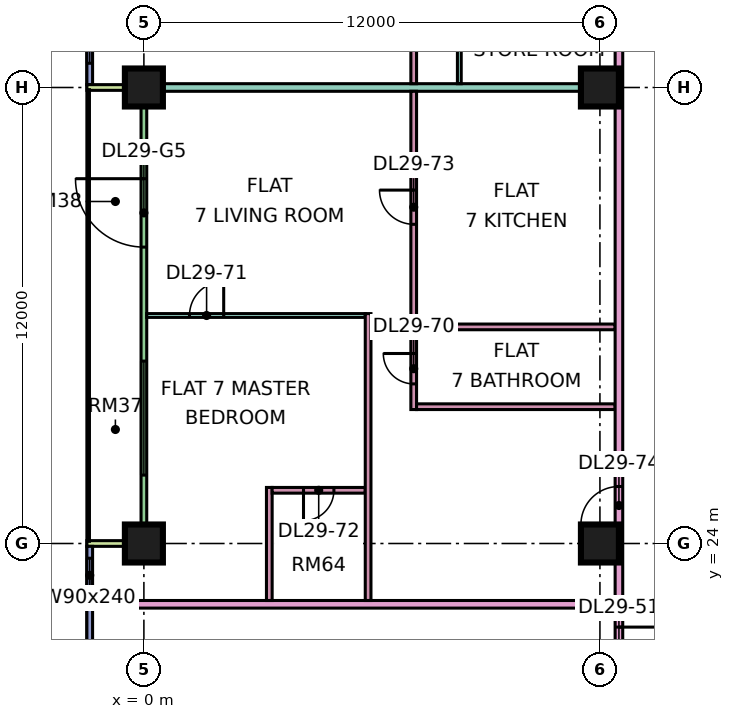
"""IFC4 building model, lengths in metres.
Left out: names, types, materials, properties, quantities, classifications, styles, units other than length and angle.
Written with IfcOpenShell. Run it as: python <this file> out.ifc"""

import sys

from ifc_helpers import new_model, si_unit, direction, frame, frame_2d, origin, origin_2d, place, context, subcontext, project, spatial, rectangle, extrude, element, fill, save


model = new_model("IFC4")
c1 = context("Model", 3, precision=1e-05, world=origin(), true_north=direction((0.0, 1.0)))
c2 = subcontext(c1, "Body", "Model", "MODEL_VIEW")
j1 = project(units=[si_unit("LENGTHUNIT", "METRE"), si_unit("PLANEANGLEUNIT", "RADIAN")], contexts=[c1])
p1 = place(None, origin())
s1 = spatial("IfcSite", under=j1, at=p1, CompositionType="ELEMENT")
p2 = place(p1, origin())
s2 = spatial("IfcBuilding", under=s1, at=p2, CompositionType="ELEMENT")
p3 = place(p2, frame((0.0, 0.0, 125.65)))
s3 = spatial("IfcBuildingStorey", under=s2, at=p3, CompositionType="ELEMENT", Elevation=125.65)
p4 = place(p3, frame((0.0, 24.0, 0.0), z_axis=(0.0, 0.0, 1.0), x_axis=(1.0, 0.0, 0.0)))
e1 = element("IfcColumn", 1, at=p4, inside=s3, PredefinedType="COLUMN", context=c2, shape_type="SweptSolid", body=[
    extrude(rectangle(XDim=1.0, YDim=1.0, at=origin_2d()), origin(), (0.0, 0.0, 1.0), 3.75),
])
p5 = place(p3, frame((0.0, 36.0, 0.0), z_axis=(0.0, 0.0, 1.0), x_axis=(1.0, 0.0, 0.0)))
e2 = element("IfcColumn", 2, at=p5, inside=s3, PredefinedType="COLUMN", context=c2, shape_type="SweptSolid", body=[
    extrude(rectangle(XDim=1.0, YDim=1.0, at=origin_2d()), origin(), (0.0, 0.0, 1.0), 3.75),
])
for number, where, z_axis, x_axis in (
    (3, (12.0, 24.0, 0.0), (0.0, 0.0, 1.0), (1.0, 0.0, 0.0)),
    (4, (12.0, 36.0, 0.0), (0.0, 0.0, 1.0), (1.0, 0.0, 0.0)),
):
    element("IfcColumn", number, at=place(p3, frame(where, z_axis=z_axis, x_axis=x_axis)), inside=s3, PredefinedType="COLUMN", context=c2, shape_type="SweptSolid", body=[
        extrude(rectangle(XDim=1.0, YDim=1.0, at=origin_2d()), origin(), (0.0, 0.0, 1.0), 3.75),
    ])
p6 = place(p3, frame((-1.425, 47.925, 0.0), z_axis=(0.0, 0.0, 1.0), x_axis=(0.0, -1.0, 0.0)))
e5 = element("IfcWall", 5, at=p6, inside=s3, PredefinedType="SOLIDWALL", context=c2, shape_type="SweptSolid", body=[
    extrude(rectangle(XDim=11.85, YDim=0.15, at=frame_2d((5.925, 0.0))), origin(), (0.0, 0.0, 1.0), 3.35),
])
p7 = place(p6, frame((0.562, 0.0, 0.45)))
e6 = element("IfcOpeningElement", 6, at=p7, cuts=e5, PredefinedType="OPENING", context=c2, shape_type="SweptSolid", body=[
    extrude(rectangle(XDim=1.8, YDim=2.4, at=frame_2d((0.9, 1.2))), frame((0.0, 0.085, 0.0), z_axis=(0.0, -1.0, 0.0), x_axis=(1.0, 0.0, 0.0)), (0.0, 0.0, 1.0), 0.17),
])
p8 = place(p6, frame((4.425, 0.0, 0.45)))
e7 = element("IfcOpeningElement", 7, at=p8, cuts=e5, PredefinedType="OPENING", context=c2, shape_type="SweptSolid", body=[
    extrude(rectangle(XDim=3.0, YDim=2.4, at=frame_2d((1.5, 1.2))), frame((0.0, 0.085, 0.0), z_axis=(0.0, -1.0, 0.0), x_axis=(1.0, 0.0, 0.0)), (0.0, 0.0, 1.0), 0.17),
])
p9 = place(p6, frame((9.488, 0.0, 0.45)))
e8 = element("IfcOpeningElement", 8, at=p9, cuts=e5, PredefinedType="OPENING", context=c2, shape_type="SweptSolid", body=[
    extrude(rectangle(XDim=1.8, YDim=2.4, at=frame_2d((0.9, 1.2))), frame((0.0, 0.085, 0.0), z_axis=(0.0, -1.0, 0.0), x_axis=(1.0, 0.0, 0.0)), (0.0, 0.0, 1.0), 0.17),
])
p10 = place(p3, frame((0.0, 35.925, 0.0), z_axis=(0.0, 0.0, 1.0), x_axis=(0.0, -1.0, 0.0)))
e9 = element("IfcWall", 9, at=p10, inside=s3, PredefinedType="SOLIDWALL", context=c2, shape_type="SweptSolid", body=[
    extrude(rectangle(XDim=11.85, YDim=0.15, at=frame_2d((5.925, 0.0))), origin(), (0.0, 0.0, 1.0), 3.35),
])
p11 = place(p10, frame((2.325, 0.0, 0.0)))
e10 = element("IfcOpeningElement", 10, at=p11, cuts=e9, PredefinedType="OPENING", context=c2, shape_type="SweptSolid", body=[
    extrude(rectangle(XDim=1.8, YDim=2.4, at=frame_2d((0.9, 1.2))), frame((0.0, 0.085, 0.0), z_axis=(0.0, -1.0, 0.0), x_axis=(1.0, 0.0, 0.0)), (0.0, 0.0, 1.0), 0.17),
])
p12 = place(p10, frame((7.125, 0.0, 0.45)))
e11 = element("IfcOpeningElement", 11, at=p12, cuts=e9, PredefinedType="OPENING", context=c2, shape_type="SweptSolid", body=[
    extrude(rectangle(XDim=3.0, YDim=2.4, at=frame_2d((1.5, 1.2))), frame((0.0, 0.085, 0.0), z_axis=(0.0, -1.0, 0.0), x_axis=(1.0, 0.0, 0.0)), (0.0, 0.0, 1.0), 0.17),
])
for number, where, z_axis, x_axis in (
    (12, (-1.5, 36.0, 0.0), (0.0, 0.0, 1.0), (1.0, 0.0, 0.0)),
    (13, (-1.5, 24.0, 0.0), (0.0, 0.0, 1.0), (1.0, 0.0, 0.0)),
):
    element("IfcWall", number, at=place(p3, frame(where, z_axis=z_axis, x_axis=x_axis)), inside=s3, PredefinedType="SOLIDWALL", context=c2, shape_type="SweptSolid", body=[
        extrude(rectangle(XDim=1.5, YDim=0.15, at=frame_2d((0.75, 0.0))), origin(), (0.0, 0.0, 1.0), 3.35),
    ])
p13 = place(p3, frame((-1.425, 23.925, 0.0), z_axis=(0.0, 0.0, 1.0), x_axis=(0.0, -1.0, 0.0)))
e14 = element("IfcWall", 14, at=p13, inside=s3, PredefinedType="SOLIDWALL", context=c2, shape_type="SweptSolid", body=[
    extrude(rectangle(XDim=11.425, YDim=0.15, at=frame_2d((5.712, 0.0))), origin(), (0.0, 0.0, 1.0), 3.35),
])
p14 = place(p13, frame((0.312, 0.0, 0.45)))
e15 = element("IfcOpeningElement", 15, at=p14, cuts=e14, PredefinedType="OPENING", context=c2, shape_type="SweptSolid", body=[
    extrude(rectangle(XDim=0.9, YDim=2.4, at=frame_2d((0.45, 1.2))), frame((0.0, 0.085, 0.0), z_axis=(0.0, -1.0, 0.0), x_axis=(1.0, 0.0, 0.0)), (0.0, 0.0, 1.0), 0.17),
])
p15 = place(p13, frame((6.175, 0.0, 0.45)))
e16 = element("IfcOpeningElement", 16, at=p15, cuts=e14, PredefinedType="OPENING", context=c2, shape_type="SweptSolid", body=[
    extrude(rectangle(XDim=3.0, YDim=2.4, at=frame_2d((1.5, 1.2))), frame((0.0, 0.085, 0.0), z_axis=(0.0, -1.0, 0.0), x_axis=(1.0, 0.0, 0.0)), (0.0, 0.0, 1.0), 0.17),
])
p16 = place(p3, frame((-1.35, 22.4, 0.0), z_axis=(0.0, 0.0, 1.0), x_axis=(1.0, 0.0, 0.0)))
e17 = element("IfcWall", 17, at=p16, inside=s3, PredefinedType="PARTITIONING", context=c2, shape_type="SweptSolid", body=[
    extrude(rectangle(XDim=13.75, YDim=0.2, at=frame_2d((6.875, 0.0))), origin(), (0.0, 0.0, 1.0), 3.35),
])
e18 = element("IfcWall", 18, at=p5, inside=s3, PredefinedType="PARTITIONING", context=c2, shape_type="SweptSolid", body=[
    extrude(rectangle(XDim=12.4, YDim=0.2, at=frame_2d((6.2, 0.0))), origin(), (0.0, 0.0, 1.0), 3.35),
])
p17 = place(p3, frame((0.074, 30.0, 0.0), z_axis=(0.0, 0.0, 1.0), x_axis=(1.0, 0.0, 0.0)))
e19 = element("IfcWall", 19, at=p17, inside=s3, PredefinedType="PARTITIONING", context=c2, shape_type="SweptSolid", body=[
    extrude(rectangle(XDim=5.751, YDim=0.1, at=frame_2d((2.875, 0.0))), origin(), (0.0, 0.0, 1.0), 3.35),
])
p18 = place(p17, frame((1.126, 0.0, 0.0)))
e20 = element("IfcOpeningElement", 20, at=p18, cuts=e19, PredefinedType="OPENING", context=c2, shape_type="SweptSolid", body=[
    extrude(rectangle(XDim=0.9, YDim=2.1, at=frame_2d((0.45, 1.05))), frame((0.0, 0.06, 0.0), z_axis=(0.0, -1.0, 0.0), x_axis=(1.0, 0.0, 0.0)), (0.0, 0.0, 1.0), 0.12),
])
p19 = place(p3, frame((3.3, 22.5, 0.0), z_axis=(0.0, 0.0, 1.0), x_axis=(0.0, 1.0, 0.0)))
e21 = element("IfcWall", 21, at=p19, inside=s3, PredefinedType="PARTITIONING", context=c2, shape_type="SweptSolid", body=[
    extrude(rectangle(XDim=2.975, YDim=0.15, at=frame_2d((1.488, 0.0))), origin(), (0.0, 0.0, 1.0), 3.35),
])
p20 = place(p3, frame((3.375, 25.4, 0.0), z_axis=(0.0, 0.0, 1.0), x_axis=(1.0, 0.0, 0.0)))
e22 = element("IfcWall", 22, at=p20, inside=s3, PredefinedType="PARTITIONING", context=c2, shape_type="SweptSolid", body=[
    extrude(rectangle(XDim=2.45, YDim=0.15, at=frame_2d((1.225, 0.0))), origin(), (0.0, 0.0, 1.0), 3.35),
])
p21 = place(p20, frame((0.825, 0.0, 0.0)))
e23 = element("IfcOpeningElement", 23, at=p21, cuts=e22, PredefinedType="OPENING", context=c2, shape_type="SweptSolid", body=[
    extrude(rectangle(XDim=0.8, YDim=2.1, at=frame_2d((0.4, 1.05))), frame((0.0, 0.085, 0.0), z_axis=(0.0, -1.0, 0.0), x_axis=(1.0, 0.0, 0.0)), (0.0, 0.0, 1.0), 0.17),
])
p22 = place(p3, frame((5.9, 22.5, 0.0), z_axis=(0.0, 0.0, 1.0), x_axis=(0.0, 1.0, 0.0)))
e24 = element("IfcWall", 24, at=p22, inside=s3, PredefinedType="PARTITIONING", context=c2, shape_type="SweptSolid", body=[
    extrude(rectangle(XDim=7.55, YDim=0.15, at=frame_2d((3.775, 0.0))), origin(), (0.0, 0.0, 1.0), 3.35),
])
p23 = place(p3, frame((7.1, 27.525, 0.0), z_axis=(0.0, 0.0, 1.0), x_axis=(0.0, 1.0, 0.0)))
e25 = element("IfcWall", 25, at=p23, inside=s3, PredefinedType="PARTITIONING", context=c2, shape_type="SweptSolid", body=[
    extrude(rectangle(XDim=8.375, YDim=0.15, at=frame_2d((4.188, 0.0))), origin(), (0.0, 0.0, 1.0), 3.35),
])
p24 = place(p23, frame((0.675, 0.0, 0.0)))
e26 = element("IfcOpeningElement", 26, at=p24, cuts=e25, PredefinedType="OPENING", context=c2, shape_type="SweptSolid", body=[
    extrude(rectangle(XDim=0.8, YDim=2.1, at=frame_2d((0.4, 1.05))), frame((0.0, 0.085, 0.0), z_axis=(0.0, -1.0, 0.0), x_axis=(1.0, 0.0, 0.0)), (0.0, 0.0, 1.0), 0.17),
])
p25 = place(p23, frame((4.875, 0.0, 0.0)))
e27 = element("IfcOpeningElement", 27, at=p25, cuts=e25, PredefinedType="OPENING", context=c2, shape_type="SweptSolid", body=[
    extrude(rectangle(XDim=0.9, YDim=2.1, at=frame_2d((0.45, 1.05))), frame((0.0, 0.085, 0.0), z_axis=(0.0, -1.0, 0.0), x_axis=(1.0, 0.0, 0.0)), (0.0, 0.0, 1.0), 0.17),
])
p26 = place(p3, frame((7.1, 36.1, 0.0), z_axis=(0.0, 0.0, 1.0), x_axis=(0.0, 1.0, 0.0)))
e28 = element("IfcWall", 28, at=p26, inside=s3, PredefinedType="PARTITIONING", context=c2, shape_type="SweptSolid", body=[
    extrude(rectangle(XDim=26.826, YDim=0.15, at=frame_2d((13.413, 0.0))), origin(), (0.0, 0.0, 1.0), 3.35),
])
p27 = place(p26, frame((0.95, 0.0, 0.0)))
e29 = element("IfcOpeningElement", 29, at=p27, cuts=e28, PredefinedType="OPENING", context=c2, shape_type="SweptSolid", body=[
    extrude(rectangle(XDim=0.9, YDim=2.1, at=frame_2d((0.45, 1.05))), frame((0.0, 0.085, 0.0), z_axis=(0.0, -1.0, 0.0), x_axis=(1.0, 0.0, 0.0)), (0.0, 0.0, 1.0), 0.17),
])
p28 = place(p26, frame((9.95, 0.0, 0.0)))
e30 = element("IfcOpeningElement", 30, at=p28, cuts=e28, PredefinedType="OPENING", context=c2, shape_type="SweptSolid", body=[
    extrude(rectangle(XDim=0.9, YDim=2.1, at=frame_2d((0.45, 1.05))), frame((0.0, 0.085, 0.0), z_axis=(0.0, -1.0, 0.0), x_axis=(1.0, 0.0, 0.0)), (0.0, 0.0, 1.0), 0.17),
])
p29 = place(p26, frame((6.95, 0.0, 0.0)))
e31 = element("IfcOpeningElement", 31, at=p29, cuts=e28, PredefinedType="OPENING", context=c2, shape_type="SweptSolid", body=[
    extrude(rectangle(XDim=0.9, YDim=2.1, at=frame_2d((0.45, 1.05))), frame((0.0, 0.085, 0.0), z_axis=(0.0, -1.0, 0.0), x_axis=(1.0, 0.0, 0.0)), (0.0, 0.0, 1.0), 0.17),
])
p30 = place(p26, frame((20.45, 0.0, 0.0)))
e32 = element("IfcOpeningElement", 32, at=p30, cuts=e28, PredefinedType="OPENING", context=c2, shape_type="SweptSolid", body=[
    extrude(rectangle(XDim=0.9, YDim=2.1, at=frame_2d((0.45, 1.05))), frame((0.0, 0.085, 0.0), z_axis=(0.0, -1.0, 0.0), x_axis=(1.0, 0.0, 0.0)), (0.0, 0.0, 1.0), 0.17),
])
p31 = place(p26, frame((25.8, 0.0, 0.0)))
e33 = element("IfcOpeningElement", 33, at=p31, cuts=e28, PredefinedType="OPENING", context=c2, shape_type="SweptSolid", body=[
    extrude(rectangle(XDim=0.8, YDim=2.1, at=frame_2d((0.4, 1.05))), frame((0.0, 0.085, 0.0), z_axis=(0.0, -1.0, 0.0), x_axis=(1.0, 0.0, 0.0)), (0.0, 0.0, 1.0), 0.17),
])
p32 = place(p26, frame((12.55, 0.0, 0.0)))
e34 = element("IfcOpeningElement", 34, at=p32, cuts=e28, PredefinedType="OPENING", context=c2, shape_type="SweptSolid", body=[
    extrude(rectangle(XDim=1.6, YDim=2.1, at=frame_2d((0.8, 1.05))), frame((0.0, 0.085, 0.0), z_axis=(0.0, -1.0, 0.0), x_axis=(1.0, 0.0, 0.0)), (0.0, 0.0, 1.0), 0.17),
])
p33 = place(p26, frame((15.95, 0.0, 0.0)))
e35 = element("IfcOpeningElement", 35, at=p33, cuts=e28, PredefinedType="OPENING", context=c2, shape_type="SweptSolid", body=[
    extrude(rectangle(XDim=0.9, YDim=2.1, at=frame_2d((0.45, 1.05))), frame((0.0, 0.085, 0.0), z_axis=(0.0, -1.0, 0.0), x_axis=(1.0, 0.0, 0.0)), (0.0, 0.0, 1.0), 0.17),
])
for number, where, z_axis, x_axis in (
    (36, (7.175, 27.6, 0.0), (0.0, 0.0, 1.0), (1.0, 0.0, 0.0)),
    (37, (7.175, 29.7, 0.0), (0.0, 0.0, 1.0), (1.0, 0.0, 0.0)),
):
    element("IfcWall", number, at=place(p3, frame(where, z_axis=z_axis, x_axis=x_axis)), inside=s3, PredefinedType="PARTITIONING", context=c2, shape_type="SweptSolid", body=[
        extrude(rectangle(XDim=5.225, YDim=0.15, at=frame_2d((2.612, 0.0))), origin(), (0.0, 0.0, 1.0), 3.35),
    ])
p34 = place(p3, frame((8.3, 36.1, 0.0), z_axis=(0.0, 0.0, 1.0), x_axis=(0.0, 1.0, 0.0)))
e38 = element("IfcWall", 38, at=p34, inside=s3, PredefinedType="PARTITIONING", context=c2, shape_type="SweptSolid", body=[
    extrude(rectangle(XDim=2.55, YDim=0.1, at=frame_2d((1.275, 0.0))), origin(), (0.0, 0.0, 1.0), 3.35),
])
p35 = place(p3, frame((12.5, 20.0, 0.0), z_axis=(0.0, 0.0, 1.0), x_axis=(0.0, 1.0, 0.0)))
e39 = element("IfcWall", 39, at=p35, inside=s3, PredefinedType="PARTITIONING", context=c2, shape_type="SweptSolid", body=[
    extrude(rectangle(XDim=43.0, YDim=0.2, at=frame_2d((21.5, 0.0))), origin(), (0.0, 0.0, 1.0), 3.35),
])
p36 = place(p35, frame((19.65, 0.0, 0.0)))
e40 = element("IfcOpeningElement", 40, at=p36, cuts=e39, PredefinedType="OPENING", context=c2, shape_type="SweptSolid", body=[
    extrude(rectangle(XDim=1.0, YDim=2.1, at=frame_2d((0.5, 1.05))), frame((0.0, 0.11, 0.0), z_axis=(0.0, -1.0, 0.0), x_axis=(1.0, 0.0, 0.0)), (0.0, 0.0, 1.0), 0.22),
])
p37 = place(p35, frame((0.6, 0.0, 0.0)))
e41 = element("IfcOpeningElement", 41, at=p37, cuts=e39, PredefinedType="OPENING", context=c2, shape_type="SweptSolid", body=[
    extrude(rectangle(XDim=1.2, YDim=2.1, at=frame_2d((0.6, 1.05))), frame((0.0, 0.11, 0.0), z_axis=(0.0, -1.0, 0.0), x_axis=(1.0, 0.0, 0.0)), (0.0, 0.0, 1.0), 0.22),
])
p38 = place(p35, frame((4.5, 0.0, 0.0)))
e42 = element("IfcOpeningElement", 42, at=p38, cuts=e39, PredefinedType="OPENING", context=c2, shape_type="SweptSolid", body=[
    extrude(rectangle(XDim=1.0, YDim=2.1, at=frame_2d((0.5, 1.05))), frame((0.0, 0.11, 0.0), z_axis=(0.0, -1.0, 0.0), x_axis=(1.0, 0.0, 0.0)), (0.0, 0.0, 1.0), 0.22),
])
p39 = place(p9, origin())
e43 = element("IfcWindow", 43, at=p39, inside=s3, PartitioningType="SINGLE_PANEL", PredefinedType="WINDOW", context=c2, shape_type="SweptSolid", body=[
    extrude(rectangle(XDim=1.8, YDim=2.4, at=frame_2d((0.9, 1.2))), frame((0.0, 0.03, 0.0), z_axis=(0.0, -1.0, 0.0), x_axis=(1.0, 0.0, 0.0)), (0.0, 0.0, 1.0), 0.06),
])
fill(e8, e43)
p40 = place(p11, frame((1.8, 0.0, 0.0), z_axis=(0.0, 0.0, 1.0), x_axis=(-1.0, 0.0, 0.0)))
e44 = element("IfcDoor", 44, at=p40, inside=s3, OperationType="DOUBLE_DOOR_SINGLE_SWING", PredefinedType="DOOR", context=c2, shape_type="SweptSolid", body=[
    extrude(rectangle(XDim=1.8, YDim=2.4, at=frame_2d((0.9, 1.2))), frame((0.0, 0.025, 0.0), z_axis=(0.0, -1.0, 0.0), x_axis=(1.0, 0.0, 0.0)), (0.0, 0.0, 1.0), 0.05),
])
fill(e10, e44)
p41 = place(p12, origin())
e45 = element("IfcWindow", 45, at=p41, inside=s3, PartitioningType="SINGLE_PANEL", PredefinedType="WINDOW", context=c2, shape_type="SweptSolid", body=[
    extrude(rectangle(XDim=3.0, YDim=2.4, at=frame_2d((1.5, 1.2))), frame((0.0, 0.03, 0.0), z_axis=(0.0, -1.0, 0.0), x_axis=(1.0, 0.0, 0.0)), (0.0, 0.0, 1.0), 0.06),
])
fill(e11, e45)
p42 = place(p14, origin())
e46 = element("IfcWindow", 46, at=p42, inside=s3, PartitioningType="SINGLE_PANEL", PredefinedType="WINDOW", context=c2, shape_type="SweptSolid", body=[
    extrude(rectangle(XDim=0.9, YDim=2.4, at=frame_2d((0.45, 1.2))), frame((0.0, 0.03, 0.0), z_axis=(0.0, -1.0, 0.0), x_axis=(1.0, 0.0, 0.0)), (0.0, 0.0, 1.0), 0.06),
])
fill(e15, e46)
p43 = place(p37, origin())
e47 = element("IfcDoor", 47, at=p43, inside=s3, OperationType="SINGLE_SWING_RIGHT", PredefinedType="DOOR", context=c2, shape_type="SweptSolid", body=[
    extrude(rectangle(XDim=1.2, YDim=2.1, at=frame_2d((0.6, 1.05))), frame((0.0, 0.025, 0.0), z_axis=(0.0, -1.0, 0.0), x_axis=(1.0, 0.0, 0.0)), (0.0, 0.0, 1.0), 0.05),
])
fill(e41, e47)
p44 = place(p24, frame((0.8, 0.0, 0.0), z_axis=(0.0, 0.0, 1.0), x_axis=(-1.0, 0.0, 0.0)))
e48 = element("IfcDoor", 48, at=p44, inside=s3, OperationType="SINGLE_SWING_RIGHT", PredefinedType="DOOR", context=c2, shape_type="SweptSolid", body=[
    extrude(rectangle(XDim=0.8, YDim=2.1, at=frame_2d((0.4, 1.05))), frame((0.0, 0.025, 0.0), z_axis=(0.0, -1.0, 0.0), x_axis=(1.0, 0.0, 0.0)), (0.0, 0.0, 1.0), 0.05),
])
fill(e26, e48)
p45 = place(p18, frame((0.9, 0.0, 0.0), z_axis=(0.0, 0.0, 1.0), x_axis=(-1.0, 0.0, 0.0)))
e49 = element("IfcDoor", 49, at=p45, inside=s3, OperationType="SINGLE_SWING_RIGHT", PredefinedType="DOOR", context=c2, shape_type="SweptSolid", body=[
    extrude(rectangle(XDim=0.9, YDim=2.1, at=frame_2d((0.45, 1.05))), frame((0.0, 0.025, 0.0), z_axis=(0.0, -1.0, 0.0), x_axis=(1.0, 0.0, 0.0)), (0.0, 0.0, 1.0), 0.05),
])
fill(e20, e49)
p46 = place(p21, frame((0.8, 0.0, 0.0), z_axis=(0.0, 0.0, 1.0), x_axis=(-1.0, 0.0, 0.0)))
e50 = element("IfcDoor", 50, at=p46, inside=s3, OperationType="SINGLE_SWING_LEFT", PredefinedType="DOOR", context=c2, shape_type="SweptSolid", body=[
    extrude(rectangle(XDim=0.8, YDim=2.1, at=frame_2d((0.4, 1.05))), frame((0.0, 0.025, 0.0), z_axis=(0.0, -1.0, 0.0), x_axis=(1.0, 0.0, 0.0)), (0.0, 0.0, 1.0), 0.05),
])
fill(e23, e50)
p47 = place(p25, frame((0.9, 0.0, 0.0), z_axis=(0.0, 0.0, 1.0), x_axis=(-1.0, 0.0, 0.0)))
e51 = element("IfcDoor", 51, at=p47, inside=s3, OperationType="SINGLE_SWING_RIGHT", PredefinedType="DOOR", context=c2, shape_type="SweptSolid", body=[
    extrude(rectangle(XDim=0.9, YDim=2.1, at=frame_2d((0.45, 1.05))), frame((0.0, 0.025, 0.0), z_axis=(0.0, -1.0, 0.0), x_axis=(1.0, 0.0, 0.0)), (0.0, 0.0, 1.0), 0.05),
])
fill(e27, e51)
p48 = place(p38, origin())
e52 = element("IfcDoor", 52, at=p48, inside=s3, OperationType="SINGLE_SWING_LEFT", PredefinedType="DOOR", context=c2, shape_type="SweptSolid", body=[
    extrude(rectangle(XDim=1.0, YDim=2.1, at=frame_2d((0.5, 1.05))), frame((0.0, 0.025, 0.0), z_axis=(0.0, -1.0, 0.0), x_axis=(1.0, 0.0, 0.0)), (0.0, 0.0, 1.0), 0.05),
])
fill(e42, e52)
save(model, sys.argv[1])
